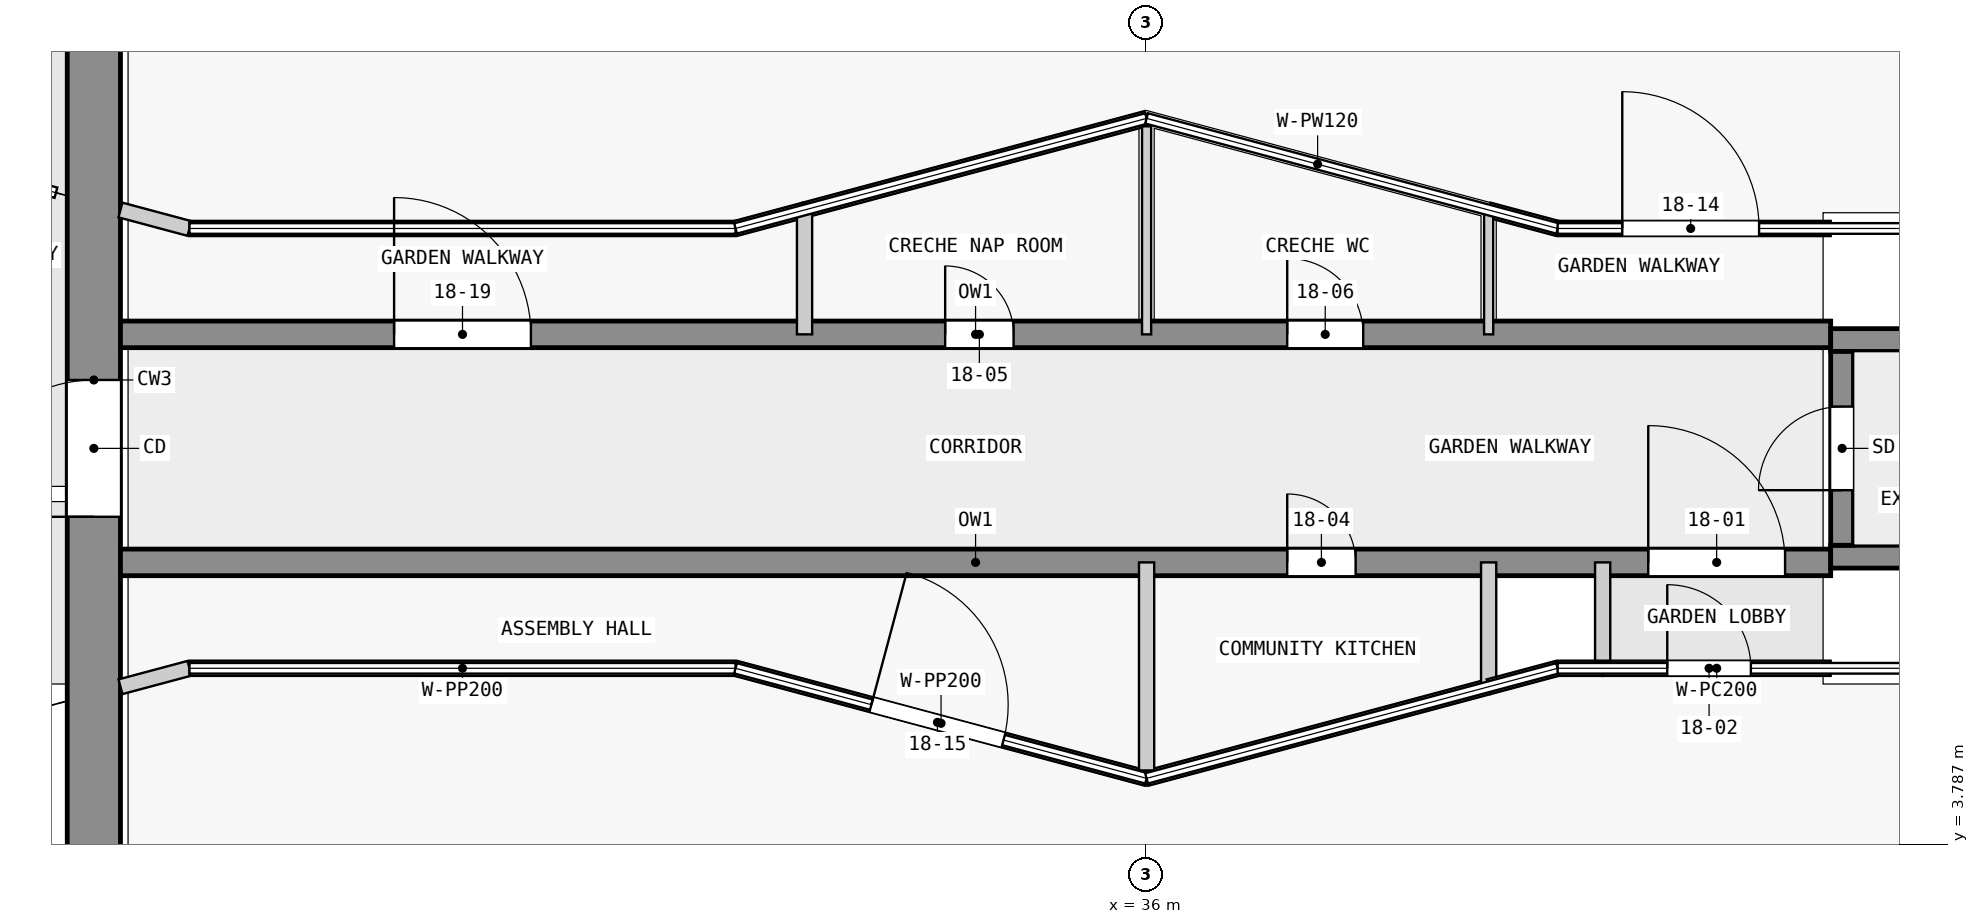
"""IFC4 building model, lengths in metres.
Left out: names, types, materials, properties, quantities, classifications, styles, units other than length and angle.
Written with IfcOpenShell. Run it as: python <this file> out.ifc"""

import sys

from ifc_helpers import new_model, si_unit, direction, frame, frame_2d, origin, place, context, subcontext, project, spatial, rectangle, extrude, element, fill, save


model = new_model("IFC4")
c1 = context("Model", 3, precision=1e-05, world=origin(), true_north=direction((0.0, 1.0)))
c2 = subcontext(c1, "Body", "Model", "MODEL_VIEW")
j1 = project(units=[si_unit("LENGTHUNIT", "METRE"), si_unit("PLANEANGLEUNIT", "RADIAN")], contexts=[c1])
p1 = place(None, origin())
s1 = spatial("IfcSite", under=j1, at=p1, CompositionType="ELEMENT")
p2 = place(p1, origin())
s2 = spatial("IfcBuilding", under=s1, at=p2, CompositionType="ELEMENT")
p3 = place(p2, frame((0.0, 0.0, 72.3)))
s3 = spatial("IfcBuildingStorey", under=s2, at=p3, CompositionType="ELEMENT", Elevation=72.3)
p4 = place(p3, frame((22.15, 2.5, 0.0), z_axis=(0.0, 0.0, 1.0), x_axis=(0.0, 1.0, 0.0)))
e1 = element("IfcWall", 1, at=p4, inside=s3, PredefinedType="SHEAR", context=c2, shape_type="SweptSolid", body=[
    extrude(rectangle(XDim=14.8, YDim=0.7, at=frame_2d((7.4, 0.0))), origin(), (0.0, 0.0, 1.0), 5.75),
])
p5 = place(p4, frame((5.6, 0.0, 0.0)))
e2 = element("IfcOpeningElement", 2, at=p5, cuts=e1, PredefinedType="OPENING", context=c2, shape_type="SweptSolid", body=[
    extrude(rectangle(XDim=1.8, YDim=2.1, at=frame_2d((0.9, 1.05))), frame((0.0, 0.36, 0.0), z_axis=(0.0, -1.0, 0.0), x_axis=(1.0, 0.0, 0.0)), (0.0, 0.0, 1.0), 0.72),
])
p6 = place(p3, frame((45.15, 7.725, 0.0), z_axis=(0.0, 0.0, 1.0), x_axis=(0.0, 1.0, 0.0)))
e3 = element("IfcWall", 3, at=p6, inside=s3, PredefinedType="SHEAR", context=c2, shape_type="SweptSolid", body=[
    extrude(rectangle(XDim=2.55, YDim=0.3, at=frame_2d((1.275, 0.0))), origin(), (0.0, 0.0, 1.0), 6.0),
])
p7 = place(p6, frame((0.725, 0.0, 0.0)))
e4 = element("IfcOpeningElement", 4, at=p7, cuts=e3, PredefinedType="OPENING", context=c2, shape_type="SweptSolid", body=[
    extrude(rectangle(XDim=1.1, YDim=2.1, at=frame_2d((0.55, 1.05))), frame((0.0, 0.16, 0.0), z_axis=(0.0, -1.0, 0.0), x_axis=(1.0, 0.0, 0.0)), (0.0, 0.0, 1.0), 0.32),
])
for number, where, z_axis, x_axis in (
    (5, (45.0, 7.575, 0.0), (0.0, 0.0, 1.0), (1.0, 0.0, 0.0)),
    (6, (45.0, 10.425, 0.0), (0.0, 0.0, 1.0), (1.0, 0.0, 0.0)),
):
    element("IfcWall", number, at=place(p3, frame(where, z_axis=z_axis, x_axis=x_axis)), inside=s3, PredefinedType="SHEAR", context=c2, shape_type="SweptSolid", body=[
        extrude(rectangle(XDim=7.2, YDim=0.3, at=frame_2d((3.6, 0.0))), origin(), (0.0, 0.0, 1.0), 6.0),
    ])
p8 = place(p3, frame((22.5, 7.5, 0.0), z_axis=(0.0, 0.0, 1.0), x_axis=(1.0, 0.0, 0.0)))
e7 = element("IfcWall", 7, at=p8, inside=s3, PredefinedType="SHEAR", context=c2, shape_type="SweptSolid", body=[
    extrude(rectangle(XDim=22.5, YDim=0.35, at=frame_2d((11.25, 0.0))), origin(), (0.0, 0.0, 1.0), 5.75),
])
p9 = place(p8, frame((20.1, 0.0, 0.0)))
e8 = element("IfcOpeningElement", 8, at=p9, cuts=e7, PredefinedType="OPENING", context=c2, shape_type="SweptSolid", body=[
    extrude(rectangle(XDim=1.8, YDim=2.1, at=frame_2d((0.9, 1.05))), frame((0.0, 0.185, 0.0), z_axis=(0.0, -1.0, 0.0), x_axis=(1.0, 0.0, 0.0)), (0.0, 0.0, 1.0), 0.37),
])
p10 = place(p8, frame((15.35, 0.0, 0.0)))
e9 = element("IfcOpeningElement", 9, at=p10, cuts=e7, PredefinedType="OPENING", context=c2, shape_type="SweptSolid", body=[
    extrude(rectangle(XDim=0.9, YDim=2.1, at=frame_2d((0.45, 1.05))), frame((0.0, 0.185, 0.0), z_axis=(0.0, -1.0, 0.0), x_axis=(1.0, 0.0, 0.0)), (0.0, 0.0, 1.0), 0.37),
])
p11 = place(p3, frame((22.5, 10.5, 0.0), z_axis=(0.0, 0.0, 1.0), x_axis=(1.0, 0.0, 0.0)))
e10 = element("IfcWall", 10, at=p11, inside=s3, PredefinedType="SHEAR", context=c2, shape_type="SweptSolid", body=[
    extrude(rectangle(XDim=22.5, YDim=0.35, at=frame_2d((11.25, 0.0))), origin(), (0.0, 0.0, 1.0), 5.75),
])
p12 = place(p11, frame((10.85, 0.0, 0.0)))
e11 = element("IfcOpeningElement", 11, at=p12, cuts=e10, PredefinedType="OPENING", context=c2, shape_type="SweptSolid", body=[
    extrude(rectangle(XDim=0.9, YDim=2.1, at=frame_2d((0.45, 1.05))), frame((0.0, 0.185, 0.0), z_axis=(0.0, -1.0, 0.0), x_axis=(1.0, 0.0, 0.0)), (0.0, 0.0, 1.0), 0.37),
])
p13 = place(p11, frame((15.35, 0.0, 0.0)))
e12 = element("IfcOpeningElement", 12, at=p13, cuts=e10, PredefinedType="OPENING", context=c2, shape_type="SweptSolid", body=[
    extrude(rectangle(XDim=1.0, YDim=2.1, at=frame_2d((0.5, 1.05))), frame((0.0, 0.185, 0.0), z_axis=(0.0, -1.0, 0.0), x_axis=(1.0, 0.0, 0.0)), (0.0, 0.0, 1.0), 0.37),
])
p14 = place(p11, frame((3.6, 0.0, 0.0)))
e13 = element("IfcOpeningElement", 13, at=p14, cuts=e10, PredefinedType="OPENING", context=c2, shape_type="SweptSolid", body=[
    extrude(rectangle(XDim=1.8, YDim=2.1, at=frame_2d((0.9, 1.05))), frame((0.0, 0.185, 0.0), z_axis=(0.0, -1.0, 0.0), x_axis=(1.0, 0.0, 0.0)), (0.0, 0.0, 1.0), 0.37),
])
p15 = place(p3, frame((22.5, 5.864, 0.0), z_axis=(0.0, 0.0, 1.0), x_axis=(0.96602336302, 0.258454758323, 0.0)))
e14 = element("IfcWall", 14, at=p15, inside=s3, PredefinedType="PARTITIONING", context=c2, shape_type="SweptSolid", body=[
    extrude(rectangle(XDim=0.94, YDim=0.2, at=frame_2d((0.47, 0.0))), origin(), (0.0, 0.0, 1.0), 5.75),
])
p16 = place(p3, frame((23.408, 6.107, 0.0), z_axis=(0.0, 0.0, 1.0), x_axis=(1.0, 0.0, 0.0)))
e15 = element("IfcWall", 15, at=p16, inside=s3, PredefinedType="PARTITIONING", context=c2, shape_type="SweptSolid", body=[
    extrude(rectangle(XDim=7.184, YDim=0.2, at=frame_2d((3.592, 0.0))), origin(), (0.0, 0.0, 1.0), 5.75),
])
p17 = place(p3, frame((30.592, 6.107, 0.0), z_axis=(0.0, 0.0, 1.0), x_axis=(0.96597315334, -0.258642353504, 0.0)))
e16 = element("IfcWall", 16, at=p17, inside=s3, PredefinedType="PARTITIONING", context=c2, shape_type="SweptSolid", body=[
    extrude(rectangle(XDim=5.598, YDim=0.2, at=frame_2d((2.799, 0.0))), origin(), (0.0, 0.0, 1.0), 5.75),
])
p18 = place(p17, frame((1.85, 0.0, 0.0)))
e17 = element("IfcOpeningElement", 17, at=p18, cuts=e16, PredefinedType="OPENING", context=c2, shape_type="SweptSolid", body=[
    extrude(rectangle(XDim=1.8, YDim=2.1, at=frame_2d((0.9, 1.05))), frame((0.0, 0.11, 0.0), z_axis=(0.0, -1.0, 0.0), x_axis=(1.0, 0.0, 0.0)), (0.0, 0.0, 1.0), 0.22),
])
p19 = place(p3, frame((22.5, 12.136, 0.0), z_axis=(0.0, 0.0, 1.0), x_axis=(0.96602336302, -0.258454758323, 0.0)))
e18 = element("IfcWall", 18, at=p19, inside=s3, PredefinedType="PARTITIONING", context=c2, shape_type="SweptSolid", body=[
    extrude(rectangle(XDim=0.94, YDim=0.2, at=frame_2d((0.47, 0.0))), origin(), (0.0, 0.0, 1.0), 5.75),
])
p20 = place(p3, frame((23.408, 11.893, 0.0), z_axis=(0.0, 0.0, 1.0), x_axis=(1.0, 0.0, 0.0)))
e19 = element("IfcWall", 19, at=p20, inside=s3, PredefinedType="PARTITIONING", context=c2, shape_type="SweptSolid", body=[
    extrude(rectangle(XDim=7.184, YDim=0.2, at=frame_2d((3.592, 0.0))), origin(), (0.0, 0.0, 1.0), 5.75),
])
p21 = place(p3, frame((30.592, 11.893, 0.0), z_axis=(0.0, 0.0, 1.0), x_axis=(0.96602336302, 0.258454758323, 0.0)))
e20 = element("IfcWall", 20, at=p21, inside=s3, PredefinedType="PARTITIONING", context=c2, shape_type="SweptSolid", body=[
    extrude(rectangle(XDim=0.94, YDim=0.2, at=frame_2d((0.47, 0.0))), origin(), (0.0, 0.0, 1.0), 5.75),
])
p22 = place(p3, frame((36.0, 4.659, 0.0), z_axis=(0.0, 0.0, 1.0), x_axis=(0.965963018817, 0.258680200786, 0.0)))
e21 = element("IfcWall", 21, at=p22, inside=s3, PredefinedType="PARTITIONING", context=c2, shape_type="SweptSolid", body=[
    extrude(rectangle(XDim=4.658, YDim=0.2, at=frame_2d((2.329, 0.0))), origin(), (0.0, 0.0, 1.0), 5.75),
])
p23 = place(p3, frame((40.5, 12.136, 0.0), z_axis=(0.0, 0.0, 1.0), x_axis=(-0.965963018817, 0.258680200786, 0.0)))
e22 = element("IfcWall", 22, at=p23, inside=s3, PredefinedType="PARTITIONING", context=c2, shape_type="SweptSolid", body=[
    extrude(rectangle(XDim=4.658, YDim=0.12, at=frame_2d((2.329, 0.0))), origin(), (0.0, 0.0, 1.0), 5.75),
])
p24 = place(p3, frame((36.0, 13.341, 0.0), z_axis=(0.0, 0.0, 1.0), x_axis=(-0.965963018817, -0.258680200786, 0.0)))
e23 = element("IfcWall", 23, at=p24, inside=s3, PredefinedType="PARTITIONING", context=c2, shape_type="SweptSolid", body=[
    extrude(rectangle(XDim=4.658, YDim=0.2, at=frame_2d((2.329, 0.0))), origin(), (0.0, 0.0, 1.0), 5.75),
])
p25 = place(p3, frame((40.5, 12.136, 0.0), z_axis=(0.0, 0.0, 1.0), x_axis=(0.96602336302, -0.258454758323, 0.0)))
e24 = element("IfcWall", 24, at=p25, inside=s3, PredefinedType="PARTITIONING", context=c2, shape_type="SweptSolid", body=[
    extrude(rectangle(XDim=0.94, YDim=0.2, at=frame_2d((0.47, 0.0))), origin(), (0.0, 0.0, 1.0), 5.75),
])
p26 = place(p3, frame((41.408, 11.893, 0.0), z_axis=(0.0, 0.0, 1.0), x_axis=(1.0, 0.0, 0.0)))
e25 = element("IfcWall", 25, at=p26, inside=s3, PredefinedType="PARTITIONING", context=c2, shape_type="SweptSolid", body=[
    extrude(rectangle(XDim=3.592, YDim=0.2, at=frame_2d((1.796, 0.0))), origin(), (0.0, 0.0, 1.0), 5.75),
])
p27 = place(p26, frame((0.85, 0.0, 0.0)))
e26 = element("IfcOpeningElement", 26, at=p27, cuts=e25, PredefinedType="OPENING", context=c2, shape_type="SweptSolid", body=[
    extrude(rectangle(XDim=1.8, YDim=2.1, at=frame_2d((0.9, 1.05))), frame((0.0, 0.11, 0.0), z_axis=(0.0, -1.0, 0.0), x_axis=(1.0, 0.0, 0.0)), (0.0, 0.0, 1.0), 0.22),
])
p28 = place(p3, frame((42.0, 6.107, 0.0), z_axis=(0.0, 0.0, 1.0), x_axis=(1.0, 0.0, 0.0)))
e27 = element("IfcWall", 27, at=p28, inside=s3, PredefinedType="PARTITIONING", context=c2, shape_type="SweptSolid", body=[
    extrude(rectangle(XDim=3.0, YDim=0.2, at=frame_2d((1.5, 0.0))), origin(), (0.0, 0.0, 1.0), 5.75),
])
p29 = place(p28, frame((0.85, 0.0, 0.0)))
e28 = element("IfcOpeningElement", 28, at=p29, cuts=e27, PredefinedType="OPENING", context=c2, shape_type="SweptSolid", body=[
    extrude(rectangle(XDim=1.1, YDim=2.1, at=frame_2d((0.55, 1.05))), frame((0.0, 0.11, 0.0), z_axis=(0.0, -1.0, 0.0), x_axis=(1.0, 0.0, 0.0)), (0.0, 0.0, 1.0), 0.22),
])
p30 = place(p3, frame((36.0, 13.237, 0.0), z_axis=(0.0, 0.0, 1.0), x_axis=(0.0, -1.0, 0.0)))
e29 = element("IfcWall", 29, at=p30, inside=s3, PredefinedType="PARTITIONING", context=c2, shape_type="SweptSolid", body=[
    extrude(rectangle(XDim=2.737, YDim=0.12, at=frame_2d((1.369, 0.0))), origin(), (0.0, 0.0, 1.0), 5.75),
])
p31 = place(p3, frame((36.0, 7.5, 0.0), z_axis=(0.0, 0.0, 1.0), x_axis=(0.0, -1.0, 0.0)))
e30 = element("IfcWall", 30, at=p31, inside=s3, PredefinedType="PARTITIONING", context=c2, shape_type="SweptSolid", body=[
    extrude(rectangle(XDim=2.737, YDim=0.2, at=frame_2d((1.369, 0.0))), origin(), (0.0, 0.0, 1.0), 5.75),
])
p32 = place(p3, frame((40.5, 10.5, 0.0), z_axis=(0.0, 0.0, 1.0), x_axis=(0.0, 1.0, 0.0)))
e31 = element("IfcWall", 31, at=p32, inside=s3, PredefinedType="PARTITIONING", context=c2, shape_type="SweptSolid", body=[
    extrude(rectangle(XDim=1.636, YDim=0.12, at=frame_2d((0.818, 0.0))), origin(), (0.0, 0.0, 1.0), 5.75),
])
for number, where, z_axis, x_axis in (
    (32, (40.5, 5.864, 0.0), (0.0, 0.0, 1.0), (0.0, 1.0, 0.0)),
    (33, (31.5, 12.136, 0.0), (0.0, 0.0, 1.0), (0.0, -1.0, 0.0)),
):
    element("IfcWall", number, at=place(p3, frame(where, z_axis=z_axis, x_axis=x_axis)), inside=s3, PredefinedType="PARTITIONING", context=c2, shape_type="SweptSolid", body=[
        extrude(rectangle(XDim=1.636, YDim=0.2, at=frame_2d((0.818, 0.0))), origin(), (0.0, 0.0, 1.0), 5.75),
    ])
p33 = place(p3, frame((42.0, 6.107, 0.0), z_axis=(0.0, 0.0, 1.0), x_axis=(-1.0, 0.0, 0.0)))
e34 = element("IfcWall", 34, at=p33, inside=s3, PredefinedType="PARTITIONING", context=c2, shape_type="SweptSolid", body=[
    extrude(rectangle(XDim=0.592, YDim=0.2, at=frame_2d((0.296, 0.0))), origin(), (0.0, 0.0, 1.0), 5.75),
])
p34 = place(p3, frame((41.408, 6.107, 0.0), z_axis=(0.0, 0.0, 1.0), x_axis=(-0.96602336302, -0.258454758323, 0.0)))
e35 = element("IfcWall", 35, at=p34, inside=s3, PredefinedType="PARTITIONING", context=c2, shape_type="SweptSolid", body=[
    extrude(rectangle(XDim=0.94, YDim=0.2, at=frame_2d((0.47, 0.0))), origin(), (0.0, 0.0, 1.0), 5.75),
])
p35 = place(p3, frame((42.0, 7.5, 0.0), z_axis=(0.0, 0.0, 1.0), x_axis=(0.0, -1.0, 0.0)))
e36 = element("IfcWall", 36, at=p35, inside=s3, PredefinedType="PARTITIONING", context=c2, shape_type="SweptSolid", body=[
    extrude(rectangle(XDim=1.293, YDim=0.2, at=frame_2d((0.646, 0.0))), origin(), (0.0, 0.0, 1.0), 5.75),
])
p36 = place(p5, origin())
e37 = element("IfcDoor", 37, at=p36, inside=s3, OperationType="DOUBLE_DOOR_SINGLE_SWING", PredefinedType="DOOR", context=c2, shape_type="SweptSolid", body=[
    extrude(rectangle(XDim=1.8, YDim=2.1, at=frame_2d((0.9, 1.05))), frame((0.0, 0.025, 0.0), z_axis=(0.0, -1.0, 0.0), x_axis=(1.0, 0.0, 0.0)), (0.0, 0.0, 1.0), 0.05),
])
fill(e2, e37)
p37 = place(p7, origin())
e38 = element("IfcDoor", 38, at=p37, inside=s3, OperationType="SINGLE_SWING_LEFT", PredefinedType="DOOR", context=c2, shape_type="SweptSolid", body=[
    extrude(rectangle(XDim=1.1, YDim=2.1, at=frame_2d((0.55, 1.05))), frame((0.0, 0.025, 0.0), z_axis=(0.0, -1.0, 0.0), x_axis=(1.0, 0.0, 0.0)), (0.0, 0.0, 1.0), 0.05),
])
fill(e4, e38)
p38 = place(p9, origin())
e39 = element("IfcDoor", 39, at=p38, inside=s3, OperationType="DOUBLE_DOOR_SINGLE_SWING", PredefinedType="DOOR", context=c2, shape_type="SweptSolid", body=[
    extrude(rectangle(XDim=1.8, YDim=2.1, at=frame_2d((0.9, 1.05))), frame((0.0, 0.025, 0.0), z_axis=(0.0, -1.0, 0.0), x_axis=(1.0, 0.0, 0.0)), (0.0, 0.0, 1.0), 0.05),
])
fill(e8, e39)
p39 = place(p29, origin())
e40 = element("IfcDoor", 40, at=p39, inside=s3, OperationType="SINGLE_SWING_LEFT", PredefinedType="DOOR", context=c2, shape_type="SweptSolid", body=[
    extrude(rectangle(XDim=1.1, YDim=2.1, at=frame_2d((0.55, 1.05))), frame((0.0, 0.025, 0.0), z_axis=(0.0, -1.0, 0.0), x_axis=(1.0, 0.0, 0.0)), (0.0, 0.0, 1.0), 0.05),
])
fill(e28, e40)
p40 = place(p10, origin())
e41 = element("IfcDoor", 41, at=p40, inside=s3, OperationType="SINGLE_SWING_RIGHT", PredefinedType="DOOR", context=c2, shape_type="SweptSolid", body=[
    extrude(rectangle(XDim=0.9, YDim=2.1, at=frame_2d((0.45, 1.05))), frame((0.0, 0.025, 0.0), z_axis=(0.0, -1.0, 0.0), x_axis=(1.0, 0.0, 0.0)), (0.0, 0.0, 1.0), 0.05),
])
fill(e9, e41)
p41 = place(p12, origin())
e42 = element("IfcDoor", 42, at=p41, inside=s3, OperationType="SINGLE_SWING_LEFT", PredefinedType="DOOR", context=c2, shape_type="SweptSolid", body=[
    extrude(rectangle(XDim=0.9, YDim=2.1, at=frame_2d((0.45, 1.05))), frame((0.0, 0.025, 0.0), z_axis=(0.0, -1.0, 0.0), x_axis=(1.0, 0.0, 0.0)), (0.0, 0.0, 1.0), 0.05),
])
fill(e11, e42)
p42 = place(p13, origin())
e43 = element("IfcDoor", 43, at=p42, inside=s3, OperationType="SINGLE_SWING_RIGHT", PredefinedType="DOOR", context=c2, shape_type="SweptSolid", body=[
    extrude(rectangle(XDim=1.0, YDim=2.1, at=frame_2d((0.5, 1.05))), frame((0.0, 0.025, 0.0), z_axis=(0.0, -1.0, 0.0), x_axis=(1.0, 0.0, 0.0)), (0.0, 0.0, 1.0), 0.05),
])
fill(e12, e43)
p43 = place(p27, origin())
e44 = element("IfcDoor", 44, at=p43, inside=s3, OperationType="DOUBLE_DOOR_SINGLE_SWING", PredefinedType="DOOR", context=c2, shape_type="SweptSolid", body=[
    extrude(rectangle(XDim=1.8, YDim=2.1, at=frame_2d((0.9, 1.05))), frame((0.0, 0.025, 0.0), z_axis=(0.0, -1.0, 0.0), x_axis=(1.0, 0.0, 0.0)), (0.0, 0.0, 1.0), 0.05),
])
fill(e26, e44)
p44 = place(p18, origin())
e45 = element("IfcDoor", 45, at=p44, inside=s3, OperationType="DOUBLE_DOOR_SINGLE_SWING", PredefinedType="DOOR", context=c2, shape_type="SweptSolid", body=[
    extrude(rectangle(XDim=1.8, YDim=2.1, at=frame_2d((0.9, 1.05))), frame((0.0, 0.025, 0.0), z_axis=(0.0, -1.0, 0.0), x_axis=(1.0, 0.0, 0.0)), (0.0, 0.0, 1.0), 0.05),
])
fill(e17, e45)
p45 = place(p14, origin())
e46 = element("IfcDoor", 46, at=p45, inside=s3, OperationType="DOUBLE_DOOR_SINGLE_SWING", PredefinedType="DOOR", context=c2, shape_type="SweptSolid", body=[
    extrude(rectangle(XDim=1.8, YDim=2.1, at=frame_2d((0.9, 1.05))), frame((0.0, 0.025, 0.0), z_axis=(0.0, -1.0, 0.0), x_axis=(1.0, 0.0, 0.0)), (0.0, 0.0, 1.0), 0.05),
])
fill(e13, e46)
save(model, sys.argv[1])
